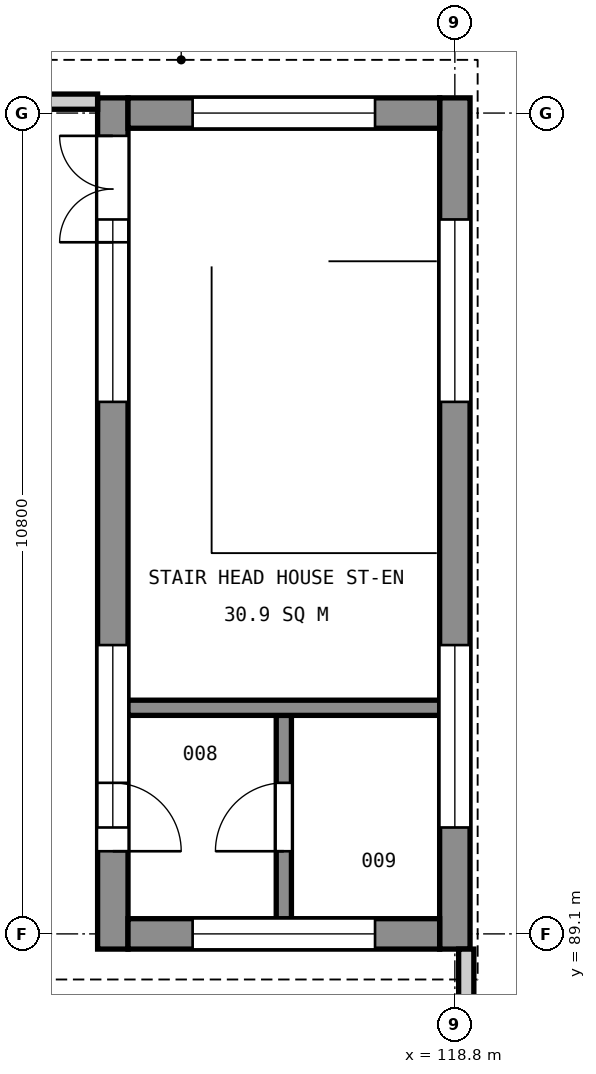
"""IFC4 building model, lengths in metres.
Left out: names, types, materials, properties, quantities, classifications, styles, units other than length and angle.
Written with IfcOpenShell. Run it as: python <this file> out.ifc"""

import sys

from ifc_helpers import new_model, si_unit, direction, frame, frame_2d, origin, place, context, subcontext, project, spatial, rectangle, extrude, element, fill, save


model = new_model("IFC4")
c1 = context("Model", 3, precision=1e-05, world=origin(), true_north=direction((0.0, 1.0)))
c2 = subcontext(c1, "Body", "Model", "MODEL_VIEW")
j1 = project(units=[si_unit("LENGTHUNIT", "METRE"), si_unit("PLANEANGLEUNIT", "RADIAN")], contexts=[c1])
p1 = place(None, origin())
s1 = spatial("IfcSite", under=j1, at=p1, CompositionType="ELEMENT")
p2 = place(p1, origin())
s2 = spatial("IfcBuilding", under=s1, at=p2, CompositionType="ELEMENT")
p3 = place(p2, frame((0.0, 0.0, 46.2)))
s3 = spatial("IfcBuildingStorey", under=s2, at=p3, CompositionType="ELEMENT", Elevation=46.2)
p4 = place(p3, frame((118.8, 88.9, 0.0), z_axis=(0.0, 0.0, 1.0), x_axis=(0.0, 1.0, 0.0)))
e1 = element("IfcWall", 1, at=p4, inside=s3, PredefinedType="SHEAR", context=c2, shape_type="SweptSolid", body=[
    extrude(rectangle(XDim=11.2, YDim=0.4, at=frame_2d((5.6, 0.0))), origin(), (0.0, 0.0, 1.0), 4.8),
])
p5 = place(p4, frame((1.6, 0.0, 3.4)))
e2 = element("IfcOpeningElement", 2, at=p5, cuts=e1, PredefinedType="OPENING", context=c2, shape_type="SweptSolid", body=[
    extrude(rectangle(XDim=2.4, YDim=1.2, at=frame_2d((1.2, 0.6))), frame((0.0, 0.21, 0.0), z_axis=(0.0, -1.0, 0.0), x_axis=(1.0, 0.0, 0.0)), (0.0, 0.0, 1.0), 0.42),
])
p6 = place(p4, frame((7.2, 0.0, 3.4)))
e3 = element("IfcOpeningElement", 3, at=p6, cuts=e1, PredefinedType="OPENING", context=c2, shape_type="SweptSolid", body=[
    extrude(rectangle(XDim=2.4, YDim=1.2, at=frame_2d((1.2, 0.6))), frame((0.0, 0.21, 0.0), z_axis=(0.0, -1.0, 0.0), x_axis=(1.0, 0.0, 0.0)), (0.0, 0.0, 1.0), 0.42),
])
p7 = place(p3, frame((114.3, 88.9, 0.0), z_axis=(0.0, 0.0, 1.0), x_axis=(0.0, 1.0, 0.0)))
e4 = element("IfcWall", 4, at=p7, inside=s3, PredefinedType="SHEAR", context=c2, shape_type="SweptSolid", body=[
    extrude(rectangle(XDim=11.2, YDim=0.4, at=frame_2d((5.6, 0.0))), origin(), (0.0, 0.0, 1.0), 4.8),
])
p8 = place(p7, frame((9.3, 0.0, 0.0)))
e5 = element("IfcOpeningElement", 5, at=p8, cuts=e4, PredefinedType="OPENING", context=c2, shape_type="SweptSolid", body=[
    extrude(rectangle(XDim=1.4, YDim=2.1, at=frame_2d((0.7, 1.05))), frame((0.0, 0.21, 0.0), z_axis=(0.0, -1.0, 0.0), x_axis=(1.0, 0.0, 0.0)), (0.0, 0.0, 1.0), 0.42),
])
p9 = place(p7, frame((1.6, 0.0, 3.4)))
e6 = element("IfcOpeningElement", 6, at=p9, cuts=e4, PredefinedType="OPENING", context=c2, shape_type="SweptSolid", body=[
    extrude(rectangle(XDim=2.4, YDim=1.2, at=frame_2d((1.2, 0.6))), frame((0.0, 0.21, 0.0), z_axis=(0.0, -1.0, 0.0), x_axis=(1.0, 0.0, 0.0)), (0.0, 0.0, 1.0), 0.42),
])
p10 = place(p7, frame((7.2, 0.0, 3.4)))
e7 = element("IfcOpeningElement", 7, at=p10, cuts=e4, PredefinedType="OPENING", context=c2, shape_type="SweptSolid", body=[
    extrude(rectangle(XDim=2.4, YDim=1.2, at=frame_2d((1.2, 0.6))), frame((0.0, 0.21, 0.0), z_axis=(0.0, -1.0, 0.0), x_axis=(1.0, 0.0, 0.0)), (0.0, 0.0, 1.0), 0.42),
])
p11 = place(p7, frame((1.288, 0.0, 0.0)))
e8 = element("IfcOpeningElement", 8, at=p11, cuts=e4, PredefinedType="OPENING", context=c2, shape_type="SweptSolid", body=[
    extrude(rectangle(XDim=0.9, YDim=2.1, at=frame_2d((0.45, 1.05))), frame((0.0, 0.21, 0.0), z_axis=(0.0, -1.0, 0.0), x_axis=(1.0, 0.0, 0.0)), (0.0, 0.0, 1.0), 0.42),
])
p12 = place(p3, frame((118.6, 89.1, 0.0), z_axis=(0.0, 0.0, 1.0), x_axis=(-1.0, 0.0, 0.0)))
e9 = element("IfcWall", 9, at=p12, inside=s3, PredefinedType="SHEAR", context=c2, shape_type="SweptSolid", body=[
    extrude(rectangle(XDim=4.1, YDim=0.4, at=frame_2d((2.05, 0.0))), origin(), (0.0, 0.0, 1.0), 4.8),
])
p13 = place(p12, frame((0.85, 0.0, 3.4)))
e10 = element("IfcOpeningElement", 10, at=p13, cuts=e9, PredefinedType="OPENING", context=c2, shape_type="SweptSolid", body=[
    extrude(rectangle(XDim=2.4, YDim=1.2, at=frame_2d((1.2, 0.6))), frame((0.0, 0.21, 0.0), z_axis=(0.0, -1.0, 0.0), x_axis=(1.0, 0.0, 0.0)), (0.0, 0.0, 1.0), 0.42),
])
p14 = place(p3, frame((118.6, 99.9, 0.0), z_axis=(0.0, 0.0, 1.0), x_axis=(-1.0, 0.0, 0.0)))
e11 = element("IfcWall", 11, at=p14, inside=s3, PredefinedType="SHEAR", context=c2, shape_type="SweptSolid", body=[
    extrude(rectangle(XDim=4.1, YDim=0.4, at=frame_2d((2.05, 0.0))), origin(), (0.0, 0.0, 1.0), 4.8),
])
p15 = place(p14, frame((0.85, 0.0, 3.4)))
e12 = element("IfcOpeningElement", 12, at=p15, cuts=e11, PredefinedType="OPENING", context=c2, shape_type="SweptSolid", body=[
    extrude(rectangle(XDim=2.4, YDim=1.2, at=frame_2d((1.2, 0.6))), frame((0.0, 0.21, 0.0), z_axis=(0.0, -1.0, 0.0), x_axis=(1.0, 0.0, 0.0)), (0.0, 0.0, 1.0), 0.42),
])
p16 = place(p3, frame((111.6, 100.05, 0.0), z_axis=(0.0, 0.0, 1.0), x_axis=(1.0, 0.0, 0.0)))
e13 = element("IfcWall", 13, at=p16, inside=s3, PredefinedType="PARAPET", context=c2, shape_type="SweptSolid", body=[
    extrude(rectangle(XDim=2.5, YDim=0.2, at=frame_2d((1.25, 0.0))), origin(), (0.0, 0.0, 1.0), 1.2),
])
p17 = place(p3, frame((118.95, 88.9, 0.0), z_axis=(0.0, 0.0, 1.0), x_axis=(0.0, -1.0, 0.0)))
e14 = element("IfcWall", 14, at=p17, inside=s3, PredefinedType="PARAPET", context=c2, shape_type="SweptSolid", body=[
    extrude(rectangle(XDim=14.0, YDim=0.2, at=frame_2d((7.0, 0.0))), origin(), (0.0, 0.0, 1.0), 1.2),
])
p18 = place(p3, frame((116.55, 89.3, 0.0), z_axis=(0.0, 0.0, 1.0), x_axis=(0.0, 1.0, 0.0)))
e15 = element("IfcWall", 15, at=p18, inside=s3, PredefinedType="SOLIDWALL", context=c2, shape_type="SweptSolid", body=[
    extrude(rectangle(XDim=2.675, YDim=0.2, at=frame_2d((1.337, 0.0))), origin(), (0.0, 0.0, 1.0), 4.8),
])
p19 = place(p18, frame((0.887, 0.0, 0.0)))
e16 = element("IfcOpeningElement", 16, at=p19, cuts=e15, PredefinedType="OPENING", context=c2, shape_type="SweptSolid", body=[
    extrude(rectangle(XDim=0.9, YDim=2.1, at=frame_2d((0.45, 1.05))), frame((0.0, 0.11, 0.0), z_axis=(0.0, -1.0, 0.0), x_axis=(1.0, 0.0, 0.0)), (0.0, 0.0, 1.0), 0.22),
])
p20 = place(p3, frame((114.5, 92.075, 0.0), z_axis=(0.0, 0.0, 1.0), x_axis=(1.0, 0.0, 0.0)))
e17 = element("IfcWall", 17, at=p20, inside=s3, PredefinedType="SOLIDWALL", context=c2, shape_type="SweptSolid", body=[
    extrude(rectangle(XDim=4.1, YDim=0.2, at=frame_2d((2.05, 0.0))), origin(), (0.0, 0.0, 1.0), 4.8),
])
p21 = place(p8, origin())
e18 = element("IfcDoor", 18, at=p21, inside=s3, OperationType="DOUBLE_DOOR_SINGLE_SWING", PredefinedType="DOOR", context=c2, shape_type="SweptSolid", body=[
    extrude(rectangle(XDim=1.4, YDim=2.1, at=frame_2d((0.7, 1.05))), frame((0.0, 0.025, 0.0), z_axis=(0.0, -1.0, 0.0), x_axis=(1.0, 0.0, 0.0)), (0.0, 0.0, 1.0), 0.05),
])
fill(e5, e18)
p22 = place(p5, origin())
e19 = element("IfcWindow", 19, at=p22, inside=s3, PartitioningType="SINGLE_PANEL", PredefinedType="USERDEFINED", context=c2, shape_type="SweptSolid", body=[
    extrude(rectangle(XDim=2.4, YDim=1.2, at=frame_2d((1.2, 0.6))), frame((0.0, 0.03, 0.0), z_axis=(0.0, -1.0, 0.0), x_axis=(1.0, 0.0, 0.0)), (0.0, 0.0, 1.0), 0.06),
])
fill(e2, e19)
p23 = place(p6, origin())
e20 = element("IfcWindow", 20, at=p23, inside=s3, PartitioningType="SINGLE_PANEL", PredefinedType="USERDEFINED", context=c2, shape_type="SweptSolid", body=[
    extrude(rectangle(XDim=2.4, YDim=1.2, at=frame_2d((1.2, 0.6))), frame((0.0, 0.03, 0.0), z_axis=(0.0, -1.0, 0.0), x_axis=(1.0, 0.0, 0.0)), (0.0, 0.0, 1.0), 0.06),
])
fill(e3, e20)
p24 = place(p9, origin())
e21 = element("IfcWindow", 21, at=p24, inside=s3, PartitioningType="SINGLE_PANEL", PredefinedType="USERDEFINED", context=c2, shape_type="SweptSolid", body=[
    extrude(rectangle(XDim=2.4, YDim=1.2, at=frame_2d((1.2, 0.6))), frame((0.0, 0.03, 0.0), z_axis=(0.0, -1.0, 0.0), x_axis=(1.0, 0.0, 0.0)), (0.0, 0.0, 1.0), 0.06),
])
fill(e6, e21)
p25 = place(p10, origin())
e22 = element("IfcWindow", 22, at=p25, inside=s3, PartitioningType="SINGLE_PANEL", PredefinedType="USERDEFINED", context=c2, shape_type="SweptSolid", body=[
    extrude(rectangle(XDim=2.4, YDim=1.2, at=frame_2d((1.2, 0.6))), frame((0.0, 0.03, 0.0), z_axis=(0.0, -1.0, 0.0), x_axis=(1.0, 0.0, 0.0)), (0.0, 0.0, 1.0), 0.06),
])
fill(e7, e22)
p26 = place(p13, origin())
e23 = element("IfcWindow", 23, at=p26, inside=s3, PartitioningType="SINGLE_PANEL", PredefinedType="USERDEFINED", context=c2, shape_type="SweptSolid", body=[
    extrude(rectangle(XDim=2.4, YDim=1.2, at=frame_2d((1.2, 0.6))), frame((0.0, 0.03, 0.0), z_axis=(0.0, -1.0, 0.0), x_axis=(1.0, 0.0, 0.0)), (0.0, 0.0, 1.0), 0.06),
])
fill(e10, e23)
p27 = place(p15, origin())
e24 = element("IfcWindow", 24, at=p27, inside=s3, PartitioningType="SINGLE_PANEL", PredefinedType="USERDEFINED", context=c2, shape_type="SweptSolid", body=[
    extrude(rectangle(XDim=2.4, YDim=1.2, at=frame_2d((1.2, 0.6))), frame((0.0, 0.03, 0.0), z_axis=(0.0, -1.0, 0.0), x_axis=(1.0, 0.0, 0.0)), (0.0, 0.0, 1.0), 0.06),
])
fill(e12, e24)
p28 = place(p11, frame((0.9, 0.0, 0.0), z_axis=(0.0, 0.0, 1.0), x_axis=(-1.0, 0.0, 0.0)))
e25 = element("IfcDoor", 25, at=p28, inside=s3, OperationType="SINGLE_SWING_RIGHT", PredefinedType="DOOR", context=c2, shape_type="SweptSolid", body=[
    extrude(rectangle(XDim=0.9, YDim=2.1, at=frame_2d((0.45, 1.05))), frame((0.0, 0.025, 0.0), z_axis=(0.0, -1.0, 0.0), x_axis=(1.0, 0.0, 0.0)), (0.0, 0.0, 1.0), 0.05),
])
fill(e8, e25)
p29 = place(p19, origin())
e26 = element("IfcDoor", 26, at=p29, inside=s3, OperationType="SINGLE_SWING_LEFT", PredefinedType="DOOR", context=c2, shape_type="SweptSolid", body=[
    extrude(rectangle(XDim=0.9, YDim=2.1, at=frame_2d((0.45, 1.05))), frame((0.0, 0.025, 0.0), z_axis=(0.0, -1.0, 0.0), x_axis=(1.0, 0.0, 0.0)), (0.0, 0.0, 1.0), 0.05),
])
fill(e16, e26)
save(model, sys.argv[1])
